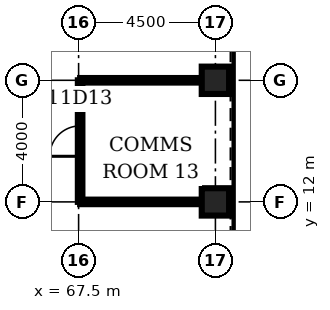
"""IFC4 building model, lengths in metres.
Left out: names, types, materials, properties, quantities, classifications, styles, units other than length and angle.
Written with IfcOpenShell. Run it as: python <this file> out.ifc"""

import sys

from ifc_helpers import new_model, si_unit, direction, frame, frame_2d, origin, origin_2d, place, context, subcontext, project, spatial, rectangle, hollow_rectangle, extrude, element, fill, save


model = new_model("IFC4")
c1 = context("Model", 3, precision=1e-05, world=origin(), true_north=direction((0.0, 1.0)))
c2 = subcontext(c1, "Body", "Model", "MODEL_VIEW")
j1 = project(units=[si_unit("LENGTHUNIT", "METRE"), si_unit("PLANEANGLEUNIT", "RADIAN")], contexts=[c1])
p1 = place(None, origin())
s1 = spatial("IfcSite", under=j1, at=p1, CompositionType="ELEMENT")
p2 = place(p1, origin())
s2 = spatial("IfcBuilding", under=s1, at=p2, CompositionType="ELEMENT")
p3 = place(p2, frame((0.0, 0.0, 54.5)))
s3 = spatial("IfcBuildingStorey", under=s2, at=p3, CompositionType="ELEMENT", Elevation=54.5)
for number, where, z_axis, x_axis in (
    (1, (72.0, 12.0, 0.0), (0.0, 0.0, 1.0), (1.0, 0.0, 0.0)),
    (2, (72.0, 16.0, 0.0), (0.0, 0.0, 1.0), (1.0, 0.0, 0.0)),
):
    element("IfcColumn", number, at=place(p3, frame(where, z_axis=z_axis, x_axis=x_axis)), inside=s3, PredefinedType="COLUMN", context=c2, shape_type="SweptSolid", body=[
        extrude(hollow_rectangle(XDim=0.9, YDim=0.9, WallThickness=0.12, at=origin_2d()), origin(), (0.0, 0.0, 1.0), 4.5),
    ])
for number, where, z_axis, x_axis in (
    (3, (67.55, 12.0, 0.0), (0.0, 0.0, 1.0), (1.0, 0.0, 0.0)),
    (4, (67.55, 16.0, 0.0), (0.0, 0.0, 1.0), (1.0, 0.0, 0.0)),
):
    element("IfcWall", number, at=place(p3, frame(where, z_axis=z_axis, x_axis=x_axis)), inside=s3, PredefinedType="PARTITIONING", context=c2, shape_type="SweptSolid", body=[
        extrude(rectangle(XDim=4.0, YDim=0.15, at=frame_2d((2.0, 0.0))), origin(), (0.0, 0.0, 1.0), 3.0),
    ])
p4 = place(p3, frame((67.55, 12.0, 0.0), z_axis=(0.0, 0.0, 1.0), x_axis=(0.0, 1.0, 0.0)))
e5 = element("IfcWall", 5, at=p4, inside=s3, PredefinedType="PARTITIONING", context=c2, shape_type="SweptSolid", body=[
    extrude(rectangle(XDim=4.0, YDim=0.15, at=frame_2d((2.0, 0.0))), origin(), (0.0, 0.0, 1.0), 3.0),
])
p5 = place(p4, frame((1.5, 0.0, 0.0)))
e6 = element("IfcOpeningElement", 6, at=p5, cuts=e5, PredefinedType="OPENING", context=c2, shape_type="SweptSolid", body=[
    extrude(rectangle(XDim=1.0, YDim=2.1, at=frame_2d((0.5, 1.05))), frame((0.0, 0.085, 0.0), z_axis=(0.0, -1.0, 0.0), x_axis=(1.0, 0.0, 0.0)), (0.0, 0.0, 1.0), 0.17),
])
p6 = place(p5, origin())
e7 = element("IfcDoor", 7, at=p6, inside=s3, OperationType="SINGLE_SWING_LEFT", PredefinedType="DOOR", context=c2, shape_type="SweptSolid", body=[
    extrude(rectangle(XDim=1.0, YDim=2.1, at=frame_2d((0.5, 1.05))), frame((0.0, 0.025, 0.0), z_axis=(0.0, -1.0, 0.0), x_axis=(1.0, 0.0, 0.0)), (0.0, 0.0, 1.0), 0.05),
])
fill(e6, e7)
save(model, sys.argv[1])
